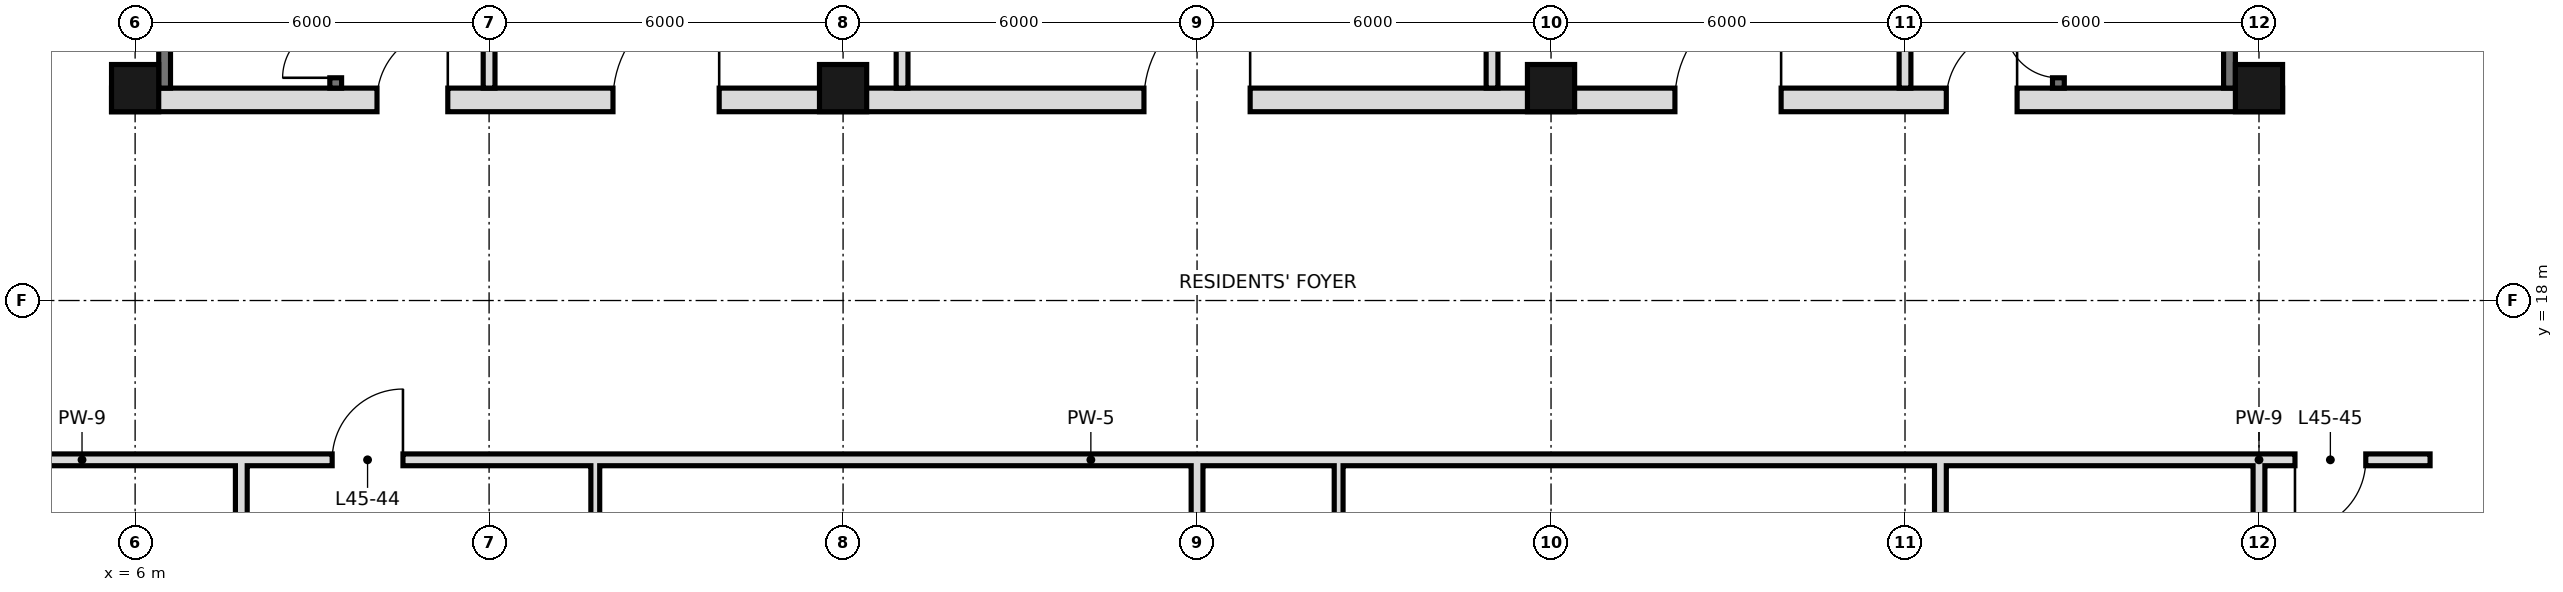
"""IFC4 building model, lengths in metres.
Left out: names, types, materials, properties, quantities, classifications, styles, units other than length and angle.
Written with IfcOpenShell. Run it as: python <this file> out.ifc"""

import sys

from ifc_helpers import new_model, si_unit, direction, frame, frame_2d, origin, origin_2d, place, context, subcontext, project, spatial, rectangle, hollow_rectangle, extrude, element, fill, save


model = new_model("IFC4")
c1 = context("Model", 3, precision=1e-05, world=origin(), true_north=direction((0.0, 1.0)))
c2 = subcontext(c1, "Body", "Model", "MODEL_VIEW")
j1 = project(units=[si_unit("LENGTHUNIT", "METRE"), si_unit("PLANEANGLEUNIT", "RADIAN")], contexts=[c1])
p1 = place(None, origin())
s1 = spatial("IfcSite", under=j1, at=p1, CompositionType="ELEMENT")
p2 = place(p1, origin())
s2 = spatial("IfcBuilding", under=s1, at=p2, CompositionType="ELEMENT")
p3 = place(p2, frame((0.0, 0.0, 195.6)))
s3 = spatial("IfcBuildingStorey", under=s2, at=p3, CompositionType="ELEMENT", Elevation=195.6)
for number, where, z_axis, x_axis in (
    (1, (6.0, 21.6, 0.0), (0.0, 0.0, 1.0), (1.0, 0.0, 0.0)),
    (2, (18.0, 21.6, 0.0), (0.0, 0.0, 1.0), (1.0, 0.0, 0.0)),
    (3, (30.0, 21.6, 0.0), (0.0, 0.0, 1.0), (1.0, 0.0, 0.0)),
    (4, (42.0, 21.6, 0.0), (0.0, 0.0, 1.0), (1.0, 0.0, 0.0)),
):
    element("IfcColumn", number, at=place(p3, frame(where, z_axis=z_axis, x_axis=x_axis)), inside=s3, PredefinedType="COLUMN", context=c2, shape_type="SweptSolid", body=[
        extrude(hollow_rectangle(XDim=0.8, YDim=0.8, WallThickness=0.045, at=origin_2d()), origin(), (0.0, 0.0, 1.0), 3.6),
    ])
p4 = place(p3, frame((13.8, 10.8, 0.0), z_axis=(0.0, 0.0, 1.0), x_axis=(0.0, 1.0, 0.0)))
e5 = element("IfcWall", 5, at=p4, inside=s3, PredefinedType="PARTITIONING", context=c2, shape_type="SweptSolid", body=[
    extrude(rectangle(XDim=4.5, YDim=0.15, at=frame_2d((2.25, 0.0))), origin(), (0.0, 0.0, 1.0), 3.42),
])
p5 = place(p3, frame((24.0, 0.0, 0.0), z_axis=(0.0, 0.0, 1.0), x_axis=(0.0, 1.0, 0.0)))
e6 = element("IfcWall", 6, at=p5, inside=s3, PredefinedType="SOLIDWALL", context=c2, shape_type="SweptSolid", body=[
    extrude(rectangle(XDim=15.3, YDim=0.2, at=frame_2d((7.65, 0.0))), origin(), (0.0, 0.0, 1.0), 2.72),
])
p6 = place(p3, frame((26.4, 10.8, 0.0), z_axis=(0.0, 0.0, 1.0), x_axis=(0.0, 1.0, 0.0)))
e7 = element("IfcWall", 7, at=p6, inside=s3, PredefinedType="PARTITIONING", context=c2, shape_type="SweptSolid", body=[
    extrude(rectangle(XDim=4.5, YDim=0.15, at=frame_2d((2.25, 0.0))), origin(), (0.0, 0.0, 1.0), 3.42),
])
for number, where, z_axis, x_axis in (
    (8, (36.6, 10.8, 0.0), (0.0, 0.0, 1.0), (0.0, 1.0, 0.0)),
    (9, (42.0, 10.8, 0.0), (0.0, 0.0, 1.0), (0.0, 1.0, 0.0)),
    (10, (7.8, 10.8, 0.0), (0.0, 0.0, 1.0), (0.0, 1.0, 0.0)),
):
    element("IfcWall", number, at=place(p3, frame(where, z_axis=z_axis, x_axis=x_axis)), inside=s3, PredefinedType="SOLIDWALL", context=c2, shape_type="SweptSolid", body=[
        extrude(rectangle(XDim=4.5, YDim=0.2, at=frame_2d((2.25, 0.0))), origin(), (0.0, 0.0, 1.0), 2.72),
    ])
p7 = place(p3, frame((7.8, 15.3, 0.0), z_axis=(0.0, 0.0, 1.0), x_axis=(1.0, 0.0, 0.0)))
e11 = element("IfcWall", 11, at=p7, inside=s3, PredefinedType="SOLIDWALL", context=c2, shape_type="SweptSolid", body=[
    extrude(rectangle(XDim=28.8, YDim=0.2, at=frame_2d((14.4, 0.0))), origin(), (0.0, 0.0, 1.0), 2.72),
])
p8 = place(p7, frame((1.54, 0.0, 0.0)))
e12 = element("IfcOpeningElement", 12, at=p8, cuts=e11, PredefinedType="OPENING", context=c2, shape_type="SweptSolid", body=[
    extrude(rectangle(XDim=1.2, YDim=2.4, at=frame_2d((0.6, 1.2))), frame((0.0, 0.11, 0.0), z_axis=(0.0, -1.0, 0.0), x_axis=(1.0, 0.0, 0.0)), (0.0, 0.0, 1.0), 0.22),
])
p9 = place(p3, frame((42.0, 15.3, 0.0), z_axis=(0.0, 0.0, 1.0), x_axis=(1.0, 0.0, 0.0)))
e13 = element("IfcWall", 13, at=p9, inside=s3, PredefinedType="SOLIDWALL", context=c2, shape_type="SweptSolid", body=[
    extrude(rectangle(XDim=2.9, YDim=0.2, at=frame_2d((1.45, 0.0))), origin(), (0.0, 0.0, 1.0), 2.72),
])
p10 = place(p9, frame((0.61, 0.0, 0.0)))
e14 = element("IfcOpeningElement", 14, at=p10, cuts=e13, PredefinedType="OPENING", context=c2, shape_type="SweptSolid", body=[
    extrude(rectangle(XDim=1.2, YDim=2.4, at=frame_2d((0.6, 1.2))), frame((0.0, 0.11, 0.0), z_axis=(0.0, -1.0, 0.0), x_axis=(1.0, 0.0, 0.0)), (0.0, 0.0, 1.0), 0.22),
])
p11 = place(p3, frame((3.1, 15.3, 0.0), z_axis=(0.0, 0.0, 1.0), x_axis=(1.0, 0.0, 0.0)))
e15 = element("IfcWall", 15, at=p11, inside=s3, PredefinedType="SOLIDWALL", context=c2, shape_type="SweptSolid", body=[
    extrude(rectangle(XDim=4.7, YDim=0.2, at=frame_2d((2.35, 0.0))), origin(), (0.0, 0.0, 1.0), 2.72),
])
p12 = place(p3, frame((36.6, 15.3, 0.0), z_axis=(0.0, 0.0, 1.0), x_axis=(1.0, 0.0, 0.0)))
e16 = element("IfcWall", 16, at=p12, inside=s3, PredefinedType="SOLIDWALL", context=c2, shape_type="SweptSolid", body=[
    extrude(rectangle(XDim=5.4, YDim=0.2, at=frame_2d((2.7, 0.0))), origin(), (0.0, 0.0, 1.0), 2.72),
])
for number, where, z_axis, x_axis in (
    (17, (6.5, 21.6, 0.0), (0.0, 0.0, 1.0), (0.0, 1.0, 0.0)),
    (18, (41.5, 21.6, 0.0), (0.0, 0.0, 1.0), (0.0, 1.0, 0.0)),
):
    element("IfcWall", number, at=place(p3, frame(where, z_axis=z_axis, x_axis=x_axis)), inside=s3, PredefinedType="SOLIDWALL", context=c2, shape_type="SweptSolid", body=[
        extrude(rectangle(XDim=23.5, YDim=0.2, at=frame_2d((11.75, 0.0))), origin(), (0.0, 0.0, 1.0), 3.42),
    ])
p13 = place(p3, frame((5.6, 21.4, 0.0), z_axis=(0.0, 0.0, 1.0), x_axis=(1.0, 0.0, 0.0)))
e19 = element("IfcWall", 19, at=p13, inside=s3, PredefinedType="SOLIDWALL", context=c2, shape_type="SweptSolid", body=[
    extrude(rectangle(XDim=36.8, YDim=0.4, at=frame_2d((18.4, 0.0))), origin(), (0.0, 0.0, 1.0), 3.42),
])
p14 = place(p13, frame((8.5, 0.0, 0.0)))
e20 = element("IfcOpeningElement", 20, at=p14, cuts=e19, PredefinedType="OPENING", context=c2, shape_type="SweptSolid", body=[
    extrude(rectangle(XDim=1.8, YDim=2.1, at=frame_2d((0.9, 1.05))), frame((0.0, 0.21, 0.0), z_axis=(0.0, -1.0, 0.0), x_axis=(1.0, 0.0, 0.0)), (0.0, 0.0, 1.0), 0.42),
])
p15 = place(p13, frame((17.5, 0.0, 0.0)))
e21 = element("IfcOpeningElement", 21, at=p15, cuts=e19, PredefinedType="OPENING", context=c2, shape_type="SweptSolid", body=[
    extrude(rectangle(XDim=1.8, YDim=2.1, at=frame_2d((0.9, 1.05))), frame((0.0, 0.21, 0.0), z_axis=(0.0, -1.0, 0.0), x_axis=(1.0, 0.0, 0.0)), (0.0, 0.0, 1.0), 0.42),
])
p16 = place(p13, frame((26.5, 0.0, 0.0)))
e22 = element("IfcOpeningElement", 22, at=p16, cuts=e19, PredefinedType="OPENING", context=c2, shape_type="SweptSolid", body=[
    extrude(rectangle(XDim=1.8, YDim=2.1, at=frame_2d((0.9, 1.05))), frame((0.0, 0.21, 0.0), z_axis=(0.0, -1.0, 0.0), x_axis=(1.0, 0.0, 0.0)), (0.0, 0.0, 1.0), 0.42),
])
p17 = place(p13, frame((4.5, 0.0, 0.0)))
e23 = element("IfcOpeningElement", 23, at=p17, cuts=e19, PredefinedType="OPENING", context=c2, shape_type="SweptSolid", body=[
    extrude(rectangle(XDim=1.2, YDim=2.1, at=frame_2d((0.6, 1.05))), frame((0.0, 0.21, 0.0), z_axis=(0.0, -1.0, 0.0), x_axis=(1.0, 0.0, 0.0)), (0.0, 0.0, 1.0), 0.42),
])
p18 = place(p13, frame((31.1, 0.0, 0.0)))
e24 = element("IfcOpeningElement", 24, at=p18, cuts=e19, PredefinedType="OPENING", context=c2, shape_type="SweptSolid", body=[
    extrude(rectangle(XDim=1.2, YDim=2.1, at=frame_2d((0.6, 1.05))), frame((0.0, 0.21, 0.0), z_axis=(0.0, -1.0, 0.0), x_axis=(1.0, 0.0, 0.0)), (0.0, 0.0, 1.0), 0.42),
])
p19 = place(p3, frame((19.0, 21.6, 0.0), z_axis=(0.0, 0.0, 1.0), x_axis=(0.0, 1.0, 0.0)))
e25 = element("IfcWall", 25, at=p19, inside=s3, PredefinedType="PARTITIONING", context=c2, shape_type="SweptSolid", body=[
    extrude(rectangle(XDim=6.0, YDim=0.2, at=frame_2d((3.0, 0.0))), origin(), (0.0, 0.0, 1.0), 3.42),
])
p20 = place(p19, frame((2.1, 0.0, 0.0)))
e26 = element("IfcOpeningElement", 26, at=p20, cuts=e25, PredefinedType="OPENING", context=c2, shape_type="SweptSolid", body=[
    extrude(rectangle(XDim=1.8, YDim=2.1, at=frame_2d((0.9, 1.05))), frame((0.0, 0.11, 0.0), z_axis=(0.0, -1.0, 0.0), x_axis=(1.0, 0.0, 0.0)), (0.0, 0.0, 1.0), 0.22),
])
p21 = place(p3, frame((29.0, 21.6, 0.0), z_axis=(0.0, 0.0, 1.0), x_axis=(0.0, 1.0, 0.0)))
e27 = element("IfcWall", 27, at=p21, inside=s3, PredefinedType="PARTITIONING", context=c2, shape_type="SweptSolid", body=[
    extrude(rectangle(XDim=6.0, YDim=0.2, at=frame_2d((3.0, 0.0))), origin(), (0.0, 0.0, 1.0), 3.42),
])
p22 = place(p21, frame((2.1, 0.0, 0.0)))
e28 = element("IfcOpeningElement", 28, at=p22, cuts=e27, PredefinedType="OPENING", context=c2, shape_type="SweptSolid", body=[
    extrude(rectangle(XDim=1.8, YDim=2.1, at=frame_2d((0.9, 1.05))), frame((0.0, 0.11, 0.0), z_axis=(0.0, -1.0, 0.0), x_axis=(1.0, 0.0, 0.0)), (0.0, 0.0, 1.0), 0.22),
])
for number, where, z_axis, x_axis in (
    (29, (12.0, 21.6, 0.0), (0.0, 0.0, 1.0), (0.0, 1.0, 0.0)),
    (30, (36.0, 21.6, 0.0), (0.0, 0.0, 1.0), (0.0, 1.0, 0.0)),
):
    element("IfcWall", number, at=place(p3, frame(where, z_axis=z_axis, x_axis=x_axis)), inside=s3, PredefinedType="PARTITIONING", context=c2, shape_type="SweptSolid", body=[
        extrude(rectangle(XDim=6.1, YDim=0.2, at=frame_2d((3.05, 0.0))), origin(), (0.0, 0.0, 1.0), 3.42),
    ])
p23 = place(p3, frame((38.6, 21.6, 0.0), z_axis=(0.0, 0.0, 1.0), x_axis=(0.0, 1.0, 0.0)))
e31 = element("IfcWall", 31, at=p23, inside=s3, PredefinedType="SOLIDWALL", context=c2, shape_type="SweptSolid", body=[
    extrude(rectangle(XDim=23.4, YDim=0.2, at=frame_2d((11.7, 0.0))), origin(), (0.0, 0.0, 1.0), 3.42),
])
p24 = place(p23, frame((7.0, 0.0, 0.0)))
e32 = element("IfcOpeningElement", 32, at=p24, cuts=e31, PredefinedType="OPENING", context=c2, shape_type="SweptSolid", body=[
    extrude(rectangle(XDim=1.1, YDim=2.1, at=frame_2d((0.55, 1.05))), frame((0.0, 0.11, 0.0), z_axis=(0.0, -1.0, 0.0), x_axis=(1.0, 0.0, 0.0)), (0.0, 0.0, 1.0), 0.22),
])
p25 = place(p23, frame((10.1, 0.0, 0.0)))
e33 = element("IfcOpeningElement", 33, at=p25, cuts=e31, PredefinedType="OPENING", context=c2, shape_type="SweptSolid", body=[
    extrude(rectangle(XDim=1.1, YDim=2.1, at=frame_2d((0.55, 1.05))), frame((0.0, 0.11, 0.0), z_axis=(0.0, -1.0, 0.0), x_axis=(1.0, 0.0, 0.0)), (0.0, 0.0, 1.0), 0.22),
])
p26 = place(p23, frame((13.2, 0.0, 0.0)))
e34 = element("IfcOpeningElement", 34, at=p26, cuts=e31, PredefinedType="OPENING", context=c2, shape_type="SweptSolid", body=[
    extrude(rectangle(XDim=1.1, YDim=2.1, at=frame_2d((0.55, 1.05))), frame((0.0, 0.11, 0.0), z_axis=(0.0, -1.0, 0.0), x_axis=(1.0, 0.0, 0.0)), (0.0, 0.0, 1.0), 0.22),
])
p27 = place(p23, frame((22.1, 0.0, 0.0)))
e35 = element("IfcOpeningElement", 35, at=p27, cuts=e31, PredefinedType="OPENING", context=c2, shape_type="SweptSolid", body=[
    extrude(rectangle(XDim=1.0, YDim=2.1, at=frame_2d((0.5, 1.05))), frame((0.0, 0.11, 0.0), z_axis=(0.0, -1.0, 0.0), x_axis=(1.0, 0.0, 0.0)), (0.0, 0.0, 1.0), 0.22),
])
p28 = place(p23, frame((0.175, 0.0, 0.0)))
e36 = element("IfcOpeningElement", 36, at=p28, cuts=e31, PredefinedType="OPENING", context=c2, shape_type="SweptSolid", body=[
    extrude(rectangle(XDim=0.9, YDim=2.1, at=frame_2d((0.45, 1.05))), frame((0.0, 0.11, 0.0), z_axis=(0.0, -1.0, 0.0), x_axis=(1.0, 0.0, 0.0)), (0.0, 0.0, 1.0), 0.22),
])
p29 = place(p3, frame((9.4, 21.6, 0.0), z_axis=(0.0, 0.0, 1.0), x_axis=(0.0, 1.0, 0.0)))
e37 = element("IfcWall", 37, at=p29, inside=s3, PredefinedType="SOLIDWALL", context=c2, shape_type="SweptSolid", body=[
    extrude(rectangle(XDim=23.4, YDim=0.2, at=frame_2d((11.7, 0.0))), origin(), (0.0, 0.0, 1.0), 3.42),
])
p30 = place(p29, frame((7.8, 0.0, 0.0)))
e38 = element("IfcOpeningElement", 38, at=p30, cuts=e37, PredefinedType="OPENING", context=c2, shape_type="SweptSolid", body=[
    extrude(rectangle(XDim=1.0, YDim=2.1, at=frame_2d((0.5, 1.05))), frame((0.0, 0.11, 0.0), z_axis=(0.0, -1.0, 0.0), x_axis=(1.0, 0.0, 0.0)), (0.0, 0.0, 1.0), 0.22),
])
p31 = place(p29, frame((12.45, 0.0, 0.0)))
e39 = element("IfcOpeningElement", 39, at=p31, cuts=e37, PredefinedType="OPENING", context=c2, shape_type="SweptSolid", body=[
    extrude(rectangle(XDim=1.0, YDim=2.1, at=frame_2d((0.5, 1.05))), frame((0.0, 0.11, 0.0), z_axis=(0.0, -1.0, 0.0), x_axis=(1.0, 0.0, 0.0)), (0.0, 0.0, 1.0), 0.22),
])
p32 = place(p29, frame((22.1, 0.0, 0.0)))
e40 = element("IfcOpeningElement", 40, at=p32, cuts=e37, PredefinedType="OPENING", context=c2, shape_type="SweptSolid", body=[
    extrude(rectangle(XDim=1.0, YDim=2.1, at=frame_2d((0.5, 1.05))), frame((0.0, 0.11, 0.0), z_axis=(0.0, -1.0, 0.0), x_axis=(1.0, 0.0, 0.0)), (0.0, 0.0, 1.0), 0.22),
])
p33 = place(p29, frame((0.175, 0.0, 0.0)))
e41 = element("IfcOpeningElement", 41, at=p33, cuts=e37, PredefinedType="OPENING", context=c2, shape_type="SweptSolid", body=[
    extrude(rectangle(XDim=0.9, YDim=2.1, at=frame_2d((0.45, 1.05))), frame((0.0, 0.11, 0.0), z_axis=(0.0, -1.0, 0.0), x_axis=(1.0, 0.0, 0.0)), (0.0, 0.0, 1.0), 0.22),
])
p34 = place(p8, frame((1.2, 0.0, 0.0), z_axis=(0.0, 0.0, 1.0), x_axis=(-1.0, 0.0, 0.0)))
e42 = element("IfcDoor", 42, at=p34, inside=s3, OperationType="SINGLE_SWING_LEFT", PredefinedType="DOOR", context=c2, shape_type="SweptSolid", body=[
    extrude(rectangle(XDim=1.2, YDim=2.4, at=frame_2d((0.6, 1.2))), frame((0.0, 0.025, 0.0), z_axis=(0.0, -1.0, 0.0), x_axis=(1.0, 0.0, 0.0)), (0.0, 0.0, 1.0), 0.05),
])
fill(e12, e42)
p35 = place(p10, frame((1.2, 0.0, 0.0), z_axis=(0.0, 0.0, 1.0), x_axis=(-1.0, 0.0, 0.0)))
e43 = element("IfcDoor", 43, at=p35, inside=s3, OperationType="SINGLE_SWING_RIGHT", PredefinedType="DOOR", context=c2, shape_type="SweptSolid", body=[
    extrude(rectangle(XDim=1.2, YDim=2.4, at=frame_2d((0.6, 1.2))), frame((0.0, 0.025, 0.0), z_axis=(0.0, -1.0, 0.0), x_axis=(1.0, 0.0, 0.0)), (0.0, 0.0, 1.0), 0.05),
])
fill(e14, e43)
p36 = place(p14, frame((1.8, 0.0, 0.0), z_axis=(0.0, 0.0, 1.0), x_axis=(-1.0, 0.0, 0.0)))
e44 = element("IfcDoor", 44, at=p36, inside=s3, OperationType="SINGLE_SWING_LEFT", PredefinedType="DOOR", context=c2, shape_type="SweptSolid", body=[
    extrude(rectangle(XDim=1.8, YDim=2.1, at=frame_2d((0.9, 1.05))), frame((0.0, 0.025, 0.0), z_axis=(0.0, -1.0, 0.0), x_axis=(1.0, 0.0, 0.0)), (0.0, 0.0, 1.0), 0.05),
])
fill(e20, e44)
p37 = place(p15, frame((1.8, 0.0, 0.0), z_axis=(0.0, 0.0, 1.0), x_axis=(-1.0, 0.0, 0.0)))
e45 = element("IfcDoor", 45, at=p37, inside=s3, OperationType="SINGLE_SWING_LEFT", PredefinedType="DOOR", context=c2, shape_type="SweptSolid", body=[
    extrude(rectangle(XDim=1.8, YDim=2.1, at=frame_2d((0.9, 1.05))), frame((0.0, 0.025, 0.0), z_axis=(0.0, -1.0, 0.0), x_axis=(1.0, 0.0, 0.0)), (0.0, 0.0, 1.0), 0.05),
])
fill(e21, e45)
p38 = place(p16, frame((1.8, 0.0, 0.0), z_axis=(0.0, 0.0, 1.0), x_axis=(-1.0, 0.0, 0.0)))
e46 = element("IfcDoor", 46, at=p38, inside=s3, OperationType="SINGLE_SWING_LEFT", PredefinedType="DOOR", context=c2, shape_type="SweptSolid", body=[
    extrude(rectangle(XDim=1.8, YDim=2.1, at=frame_2d((0.9, 1.05))), frame((0.0, 0.025, 0.0), z_axis=(0.0, -1.0, 0.0), x_axis=(1.0, 0.0, 0.0)), (0.0, 0.0, 1.0), 0.05),
])
fill(e22, e46)
p39 = place(p17, frame((1.2, 0.0, 0.0), z_axis=(0.0, 0.0, 1.0), x_axis=(-1.0, 0.0, 0.0)))
e47 = element("IfcDoor", 47, at=p39, inside=s3, OperationType="SINGLE_SWING_LEFT", PredefinedType="DOOR", context=c2, shape_type="SweptSolid", body=[
    extrude(rectangle(XDim=1.2, YDim=2.1, at=frame_2d((0.6, 1.05))), frame((0.0, 0.025, 0.0), z_axis=(0.0, -1.0, 0.0), x_axis=(1.0, 0.0, 0.0)), (0.0, 0.0, 1.0), 0.05),
])
fill(e23, e47)
p40 = place(p18, frame((1.2, 0.0, 0.0), z_axis=(0.0, 0.0, 1.0), x_axis=(-1.0, 0.0, 0.0)))
e48 = element("IfcDoor", 48, at=p40, inside=s3, OperationType="SINGLE_SWING_LEFT", PredefinedType="DOOR", context=c2, shape_type="SweptSolid", body=[
    extrude(rectangle(XDim=1.2, YDim=2.1, at=frame_2d((0.6, 1.05))), frame((0.0, 0.025, 0.0), z_axis=(0.0, -1.0, 0.0), x_axis=(1.0, 0.0, 0.0)), (0.0, 0.0, 1.0), 0.05),
])
fill(e24, e48)
p41 = place(p33, origin())
e49 = element("IfcDoor", 49, at=p41, inside=s3, OperationType="SINGLE_SWING_LEFT", PredefinedType="DOOR", context=c2, shape_type="SweptSolid", body=[
    extrude(rectangle(XDim=0.9, YDim=2.1, at=frame_2d((0.45, 1.05))), frame((0.0, 0.025, 0.0), z_axis=(0.0, -1.0, 0.0), x_axis=(1.0, 0.0, 0.0)), (0.0, 0.0, 1.0), 0.05),
])
fill(e41, e49)
p42 = place(p28, frame((0.9, 0.0, 0.0), z_axis=(0.0, 0.0, 1.0), x_axis=(-1.0, 0.0, 0.0)))
e50 = element("IfcDoor", 50, at=p42, inside=s3, OperationType="SINGLE_SWING_LEFT", PredefinedType="DOOR", context=c2, shape_type="SweptSolid", body=[
    extrude(rectangle(XDim=0.9, YDim=2.1, at=frame_2d((0.45, 1.05))), frame((0.0, 0.025, 0.0), z_axis=(0.0, -1.0, 0.0), x_axis=(1.0, 0.0, 0.0)), (0.0, 0.0, 1.0), 0.05),
])
fill(e36, e50)
save(model, sys.argv[1])
